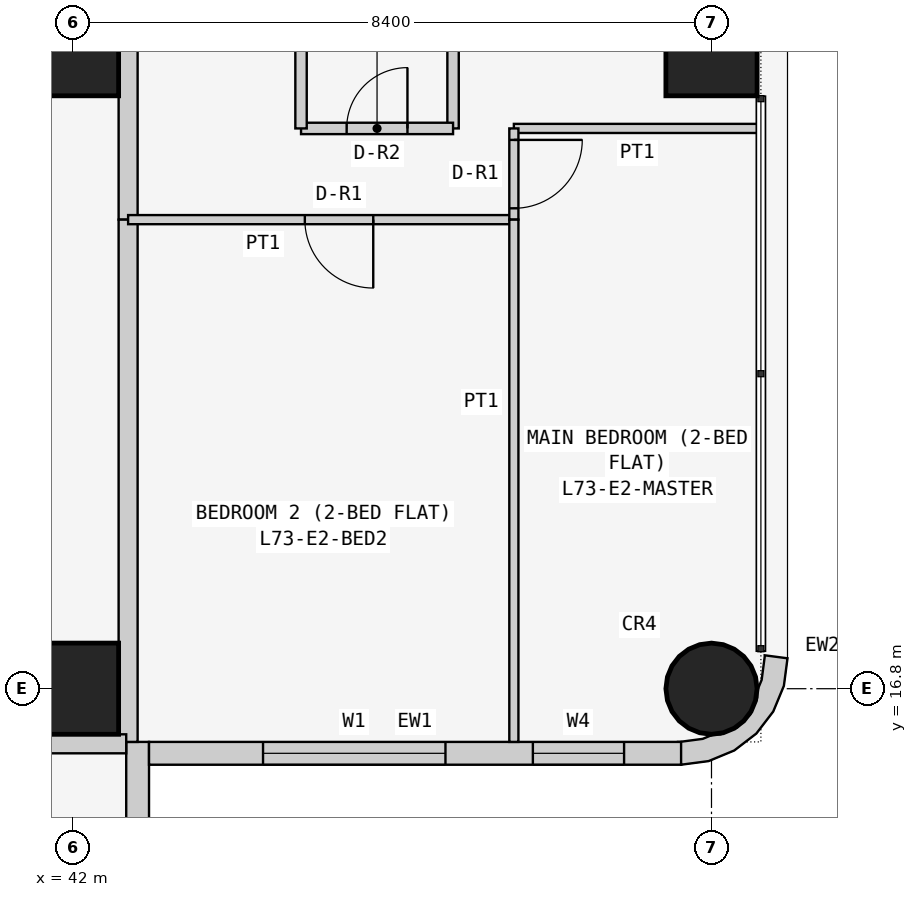
"""IFC4 building model, lengths in metres.
Left out: names, types, materials, properties, quantities, classifications, styles, units other than length and angle.
Written with IfcOpenShell. Run it as: python <this file> out.ifc"""

import sys

from ifc_helpers import new_model, si_unit, direction, frame, frame_2d, origin, origin_2d, place, context, subcontext, project, spatial, polyline, rectangle, circle, outline, extrude, element, fill, save


model = new_model("IFC4")
c1 = context("Model", 3, precision=1e-05, world=origin(), true_north=direction((0.0, 1.0)))
c2 = subcontext(c1, "Body", "Model", "MODEL_VIEW")
j1 = project(units=[si_unit("LENGTHUNIT", "METRE"), si_unit("PLANEANGLEUNIT", "RADIAN")], contexts=[c1])
p1 = place(None, origin())
s1 = spatial("IfcSite", under=j1, at=p1, CompositionType="ELEMENT")
p2 = place(p1, origin())
s2 = spatial("IfcBuilding", under=s1, at=p2, CompositionType="ELEMENT")
p3 = place(p2, frame((0.0, 0.0, 279.3)))
s3 = spatial("IfcBuildingStorey", under=s2, at=p3, CompositionType="ELEMENT", Elevation=279.3)
for number, where, z_axis, x_axis in (
    (1, (42.0, 16.8, 0.0), (0.0, 0.0, 1.0), (1.0, 0.0, 0.0)),
    (2, (42.0, 25.2, 0.0), (0.0, 0.0, 1.0), (1.0, 0.0, 0.0)),
):
    element("IfcColumn", number, at=place(p3, frame(where, z_axis=z_axis, x_axis=x_axis)), inside=s3, PredefinedType="COLUMN", context=c2, shape_type="SweptSolid", body=[
        extrude(rectangle(XDim=1.2, YDim=1.2, at=origin_2d()), origin(), (0.0, 0.0, 1.0), 3.6),
    ])
p4 = place(p3, frame((50.4, 16.8, 0.0), z_axis=(0.0, 0.0, 1.0), x_axis=(1.0, 0.0, 0.0)))
e3 = element("IfcColumn", 3, at=p4, inside=s3, PredefinedType="COLUMN", context=c2, shape_type="SweptSolid", body=[
    extrude(circle(Radius=0.6, at=origin_2d()), origin(), (0.0, 0.0, 1.0), 3.6),
])
p5 = place(p3, frame((50.4, 25.2, 0.0), z_axis=(0.0, 0.0, 1.0), x_axis=(1.0, 0.0, 0.0)))
e4 = element("IfcColumn", 4, at=p5, inside=s3, PredefinedType="COLUMN", context=c2, shape_type="SweptSolid", body=[
    extrude(rectangle(XDim=1.2, YDim=1.2, at=origin_2d()), origin(), (0.0, 0.0, 1.0), 3.6),
])
p6 = place(p3, frame((42.85, 8.8, 0.0), z_axis=(0.0, 0.0, 1.0), x_axis=(0.0, 1.0, 0.0)))
e5 = element("IfcWall", 5, at=p6, inside=s3, PredefinedType="SOLIDWALL", context=c2, shape_type="SweptSolid", body=[
    extrude(rectangle(XDim=7.3, YDim=0.3, at=frame_2d((3.65, 0.0))), origin(), (0.0, 0.0, 1.0), 3.45),
])
p7 = place(p6, frame((3.1, 0.0, 0.9)))
e6 = element("IfcOpeningElement", 6, at=p7, cuts=e5, PredefinedType="OPENING", context=c2, shape_type="SweptSolid", body=[
    extrude(rectangle(XDim=2.4, YDim=1.5, at=frame_2d((1.2, 0.75))), frame((0.0, 0.16, 0.0), z_axis=(0.0, -1.0, 0.0), x_axis=(1.0, 0.0, 0.0)), (0.0, 0.0, 1.0), 0.32),
])
p8 = place(p6, frame((0.75, 0.0, 0.9)))
e7 = element("IfcOpeningElement", 7, at=p8, cuts=e5, PredefinedType="OPENING", context=c2, shape_type="SweptSolid", body=[
    extrude(rectangle(XDim=1.2, YDim=1.5, at=frame_2d((0.6, 0.75))), frame((0.0, 0.16, 0.0), z_axis=(0.0, -1.0, 0.0), x_axis=(1.0, 0.0, 0.0)), (0.0, 0.0, 1.0), 0.32),
])
p9 = place(p3, frame((43.0, 15.95, 0.0), z_axis=(0.0, 0.0, 1.0), x_axis=(1.0, 0.0, 0.0)))
e8 = element("IfcWall", 8, at=p9, inside=s3, PredefinedType="SOLIDWALL", context=c2, shape_type="SweptSolid", body=[
    extrude(rectangle(XDim=7.0, YDim=0.3, at=frame_2d((3.5, 0.0))), origin(), (0.0, 0.0, 1.0), 3.45),
])
p10 = place(p9, frame((1.5, 0.0, 0.9)))
e9 = element("IfcOpeningElement", 9, at=p10, cuts=e8, PredefinedType="OPENING", context=c2, shape_type="SweptSolid", body=[
    extrude(rectangle(XDim=2.4, YDim=1.5, at=frame_2d((1.2, 0.75))), frame((0.0, 0.16, 0.0), z_axis=(0.0, -1.0, 0.0), x_axis=(1.0, 0.0, 0.0)), (0.0, 0.0, 1.0), 0.32),
])
p11 = place(p9, frame((5.05, 0.0, 0.9)))
e10 = element("IfcOpeningElement", 10, at=p11, cuts=e8, PredefinedType="OPENING", context=c2, shape_type="SweptSolid", body=[
    extrude(rectangle(XDim=1.2, YDim=1.5, at=frame_2d((0.6, 0.75))), frame((0.0, 0.16, 0.0), z_axis=(0.0, -1.0, 0.0), x_axis=(1.0, 0.0, 0.0)), (0.0, 0.0, 1.0), 0.32),
])
p12 = place(p3, frame((50.038, 16.224, 0.0), z_axis=(0.0, 0.0, 1.0), x_axis=(0.707106781187, -0.707106781187, 0.0)))
e11 = element("IfcWall", 11, at=p12, inside=s3, PredefinedType="SOLIDWALL", context=c2, shape_type="SweptSolid", body=[
    extrude(outline(polyline([(0.047, 1.455), (0.233, 1.212), (0.292, 1.069), (0.358, 1.003), (0.449, 0.782), (0.449, 0.543), (0.358, 0.322), (0.292, 0.257), (0.233, 0.114), (0.047, -0.129), (0.033, -0.143), (0.273, -0.327), (0.495, -0.037), (0.635, 0.301), (0.683, 0.663), (0.635, 1.025), (0.495, 1.363), (0.273, 1.653), (0.033, 1.469), (0.047, 1.455)])), origin(), (0.0, 0.0, 1.0), 3.45),
])
p13 = place(p3, frame((42.725, 29.4, 0.0), z_axis=(0.0, 0.0, 1.0), x_axis=(0.0, -1.0, 0.0)))
e12 = element("IfcWall", 12, at=p13, inside=s3, PredefinedType="PARTITIONING", context=c2, shape_type="SweptSolid", body=[
    extrude(rectangle(XDim=6.429, YDim=0.25, at=frame_2d((3.214, 0.0))), origin(), (0.0, 0.0, 1.0), 3.45),
])
p14 = place(p13, frame((0.5, 0.0, 0.0)))
e13 = element("IfcOpeningElement", 13, at=p14, cuts=e12, PredefinedType="OPENING", context=c2, shape_type="SweptSolid", body=[
    extrude(rectangle(XDim=1.0, YDim=2.1, at=frame_2d((0.5, 1.05))), frame((0.0, 0.135, 0.0), z_axis=(0.0, -1.0, 0.0), x_axis=(1.0, 0.0, 0.0)), (0.0, 0.0, 1.0), 0.27),
])
p15 = place(p3, frame((42.725, 22.971, 0.0), z_axis=(0.0, 0.0, 1.0), x_axis=(0.0, -1.0, 0.0)))
e14 = element("IfcWall", 14, at=p15, inside=s3, PredefinedType="PARTITIONING", context=c2, shape_type="SweptSolid", body=[
    extrude(rectangle(XDim=6.871, YDim=0.25, at=frame_2d((3.436, 0.0))), origin(), (0.0, 0.0, 1.0), 3.45),
])
p16 = place(p3, frame((42.7, 16.075, 0.0), z_axis=(0.0, 0.0, 1.0), x_axis=(-1.0, 0.0, 0.0)))
e15 = element("IfcWall", 15, at=p16, inside=s3, PredefinedType="PARTITIONING", context=c2, shape_type="SweptSolid", body=[
    extrude(rectangle(XDim=6.471, YDim=0.25, at=frame_2d((3.235, 0.0))), origin(), (0.0, 0.0, 1.0), 3.45),
])
p17 = place(p3, frame((47.0, 29.4, 0.0), z_axis=(0.0, 0.0, 1.0), x_axis=(0.0, -1.0, 0.0)))
e16 = element("IfcWall", 16, at=p17, inside=s3, PredefinedType="PARTITIONING", context=c2, shape_type="SweptSolid", body=[
    extrude(rectangle(XDim=5.229, YDim=0.15, at=frame_2d((2.615, 0.0))), origin(), (0.0, 0.0, 1.0), 3.45),
])
p18 = place(p3, frame((47.0, 24.171, 0.0), z_axis=(0.0, 0.0, 1.0), x_axis=(-1.0, 0.0, 0.0)))
e17 = element("IfcWall", 17, at=p18, inside=s3, PredefinedType="PARTITIONING", context=c2, shape_type="SweptSolid", body=[
    extrude(rectangle(XDim=2.0, YDim=0.15, at=frame_2d((1.0, 0.0))), origin(), (0.0, 0.0, 1.0), 3.45),
])
p19 = place(p18, frame((0.6, 0.0, 0.0)))
e18 = element("IfcOpeningElement", 18, at=p19, cuts=e17, PredefinedType="OPENING", context=c2, shape_type="SweptSolid", body=[
    extrude(rectangle(XDim=0.8, YDim=2.1, at=frame_2d((0.4, 1.05))), frame((0.0, 0.085, 0.0), z_axis=(0.0, -1.0, 0.0), x_axis=(1.0, 0.0, 0.0)), (0.0, 0.0, 1.0), 0.17),
])
p20 = place(p3, frame((45.0, 24.171, 0.0), z_axis=(0.0, 0.0, 1.0), x_axis=(0.0, 1.0, 0.0)))
e19 = element("IfcWall", 19, at=p20, inside=s3, PredefinedType="PARTITIONING", context=c2, shape_type="SweptSolid", body=[
    extrude(rectangle(XDim=5.229, YDim=0.15, at=frame_2d((2.615, 0.0))), origin(), (0.0, 0.0, 1.0), 3.45),
])
p21 = place(p3, frame((47.8, 22.971, 0.0), z_axis=(0.0, 0.0, 1.0), x_axis=(-1.0, 0.0, 0.0)))
e20 = element("IfcWall", 20, at=p21, inside=s3, PredefinedType="PARTITIONING", context=c2, shape_type="SweptSolid", body=[
    extrude(rectangle(XDim=5.075, YDim=0.12, at=frame_2d((2.538, 0.0))), origin(), (0.0, 0.0, 1.0), 3.45),
])
p22 = place(p21, frame((1.85, 0.0, 0.0)))
e21 = element("IfcOpeningElement", 21, at=p22, cuts=e20, PredefinedType="OPENING", context=c2, shape_type="SweptSolid", body=[
    extrude(rectangle(XDim=0.9, YDim=2.1, at=frame_2d((0.45, 1.05))), frame((0.0, 0.07, 0.0), z_axis=(0.0, -1.0, 0.0), x_axis=(1.0, 0.0, 0.0)), (0.0, 0.0, 1.0), 0.14),
])
p23 = place(p3, frame((51.05, 24.171, 0.0), z_axis=(0.0, 0.0, 1.0), x_axis=(-1.0, 0.0, 0.0)))
e22 = element("IfcWall", 22, at=p23, inside=s3, PredefinedType="PARTITIONING", context=c2, shape_type="SweptSolid", body=[
    extrude(rectangle(XDim=3.25, YDim=0.12, at=frame_2d((1.625, 0.0))), origin(), (0.0, 0.0, 1.0), 3.45),
])
p24 = place(p3, frame((47.8, 24.171, 0.0), z_axis=(0.0, 0.0, 1.0), x_axis=(0.0, -1.0, 0.0)))
e23 = element("IfcWall", 23, at=p24, inside=s3, PredefinedType="PARTITIONING", context=c2, shape_type="SweptSolid", body=[
    extrude(rectangle(XDim=1.2, YDim=0.12, at=frame_2d((0.6, 0.0))), origin(), (0.0, 0.0, 1.0), 3.45),
])
p25 = place(p24, frame((0.151, 0.0, 0.0)))
e24 = element("IfcOpeningElement", 24, at=p25, cuts=e23, PredefinedType="OPENING", context=c2, shape_type="SweptSolid", body=[
    extrude(rectangle(XDim=0.9, YDim=2.1, at=frame_2d((0.45, 1.05))), frame((0.0, 0.07, 0.0), z_axis=(0.0, -1.0, 0.0), x_axis=(1.0, 0.0, 0.0)), (0.0, 0.0, 1.0), 0.14),
])
p26 = place(p3, frame((47.8, 22.971, 0.0), z_axis=(0.0, 0.0, 1.0), x_axis=(0.0, -1.0, 0.0)))
e25 = element("IfcWall", 25, at=p26, inside=s3, PredefinedType="PARTITIONING", context=c2, shape_type="SweptSolid", body=[
    extrude(rectangle(XDim=6.871, YDim=0.12, at=frame_2d((3.436, 0.0))), origin(), (0.0, 0.0, 1.0), 3.45),
])
p27 = place(p10, origin())
e26 = element("IfcWindow", 26, at=p27, inside=s3, PartitioningType="SINGLE_PANEL", PredefinedType="WINDOW", context=c2, shape_type="SweptSolid", body=[
    extrude(rectangle(XDim=2.4, YDim=1.5, at=frame_2d((1.2, 0.75))), frame((0.0, 0.03, 0.0), z_axis=(0.0, -1.0, 0.0), x_axis=(1.0, 0.0, 0.0)), (0.0, 0.0, 1.0), 0.06),
])
fill(e9, e26)
p28 = place(p11, origin())
e27 = element("IfcWindow", 27, at=p28, inside=s3, PartitioningType="SINGLE_PANEL", PredefinedType="WINDOW", context=c2, shape_type="SweptSolid", body=[
    extrude(rectangle(XDim=1.2, YDim=1.5, at=frame_2d((0.6, 0.75))), frame((0.0, 0.03, 0.0), z_axis=(0.0, -1.0, 0.0), x_axis=(1.0, 0.0, 0.0)), (0.0, 0.0, 1.0), 0.06),
])
fill(e10, e27)
p29 = place(p19, frame((0.8, 0.0, 0.0), z_axis=(0.0, 0.0, 1.0), x_axis=(-1.0, 0.0, 0.0)))
e28 = element("IfcDoor", 28, at=p29, inside=s3, OperationType="SINGLE_SWING_RIGHT", PredefinedType="DOOR", context=c2, shape_type="SweptSolid", body=[
    extrude(rectangle(XDim=0.8, YDim=2.1, at=frame_2d((0.4, 1.05))), frame((0.0, 0.025, 0.0), z_axis=(0.0, -1.0, 0.0), x_axis=(1.0, 0.0, 0.0)), (0.0, 0.0, 1.0), 0.05),
])
fill(e18, e28)
p30 = place(p22, origin())
e29 = element("IfcDoor", 29, at=p30, inside=s3, OperationType="SINGLE_SWING_LEFT", PredefinedType="DOOR", context=c2, shape_type="SweptSolid", body=[
    extrude(rectangle(XDim=0.9, YDim=2.1, at=frame_2d((0.45, 1.05))), frame((0.0, 0.025, 0.0), z_axis=(0.0, -1.0, 0.0), x_axis=(1.0, 0.0, 0.0)), (0.0, 0.0, 1.0), 0.05),
])
fill(e21, e29)
p31 = place(p25, origin())
e30 = element("IfcDoor", 30, at=p31, inside=s3, OperationType="SINGLE_SWING_LEFT", PredefinedType="DOOR", context=c2, shape_type="SweptSolid", body=[
    extrude(rectangle(XDim=0.9, YDim=2.1, at=frame_2d((0.45, 1.05))), frame((0.0, 0.025, 0.0), z_axis=(0.0, -1.0, 0.0), x_axis=(1.0, 0.0, 0.0)), (0.0, 0.0, 1.0), 0.05),
])
fill(e24, e30)
save(model, sys.argv[1])
